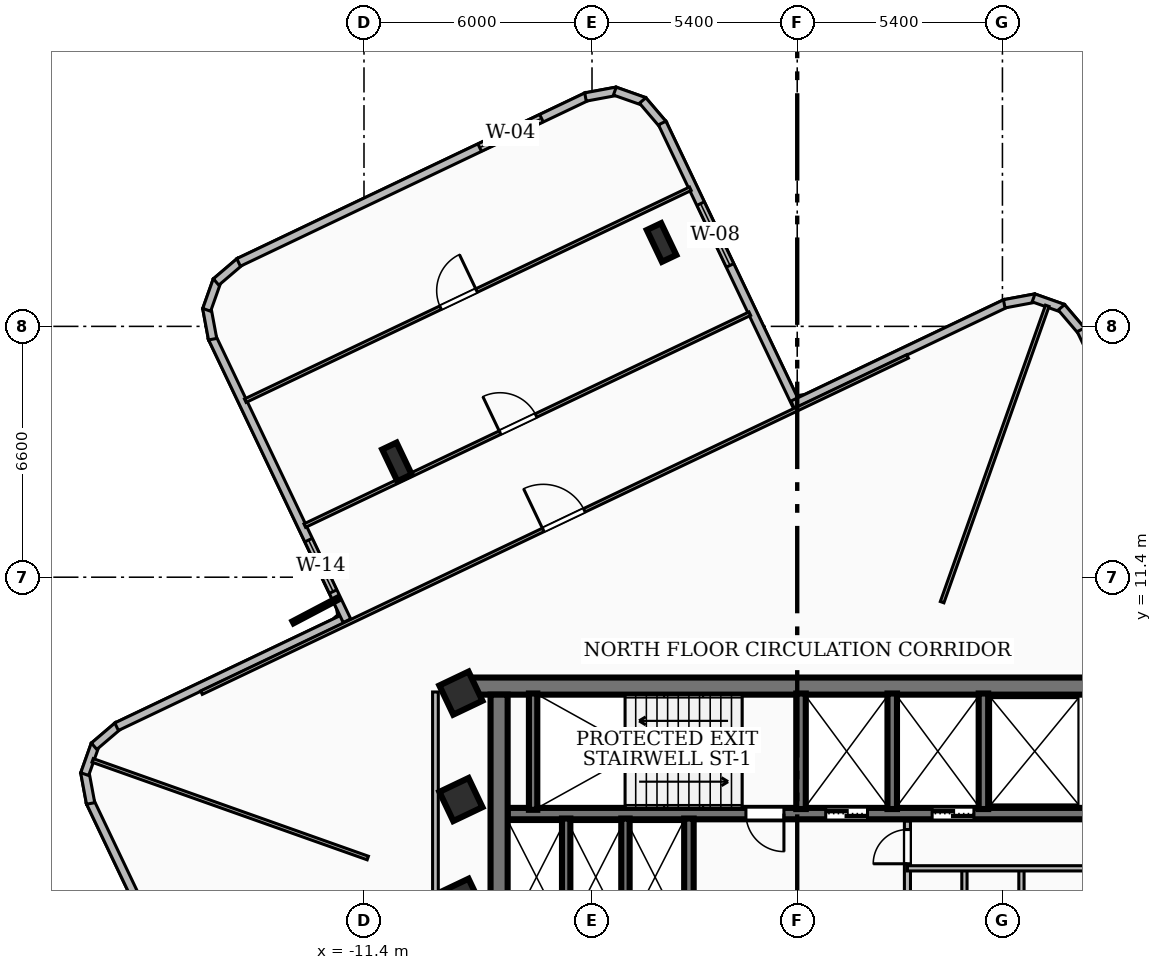
"""IFC4 building model, lengths in metres.
Left out: names, types, materials, properties, quantities, classifications, styles, units other than length and angle.
Written with IfcOpenShell. Run it as: python <this file> out.ifc"""

import sys

from ifc_helpers import new_model, si_unit, direction, frame, frame_2d, origin, origin_2d, place, context, subcontext, project, spatial, rectangle, i_section, extrude, element, fill, save


model = new_model("IFC4")
c1 = context("Model", 3, precision=1e-05, world=origin(), true_north=direction((0.0, 1.0)))
c2 = subcontext(c1, "Body", "Model", "MODEL_VIEW")
j1 = project(units=[si_unit("LENGTHUNIT", "METRE"), si_unit("PLANEANGLEUNIT", "RADIAN")], contexts=[c1])
p1 = place(None, origin())
s1 = spatial("IfcSite", under=j1, at=p1, CompositionType="ELEMENT")
p2 = place(p1, origin())
s2 = spatial("IfcBuilding", under=s1, at=p2, CompositionType="ELEMENT")
p3 = place(p2, frame((0.0, 0.0, 188.28)))
s3 = spatial("IfcBuildingStorey", under=s2, at=p3, CompositionType="ELEMENT", Elevation=188.28)
p4 = place(p3, frame((-8.78, 8.535, 0.0), z_axis=(0.0, 0.0, 1.0), x_axis=(1.0, 0.0, 0.0)))
e1 = element("IfcWall", 1, at=p4, inside=s3, PredefinedType="SHEAR", context=c2, shape_type="SweptSolid", body=[
    extrude(rectangle(XDim=17.56, YDim=0.45, at=frame_2d((8.78, 0.0))), origin(), (0.0, 0.0, 1.0), 4.06),
])
p5 = place(p3, frame((-7.845, 1.975, 0.0), z_axis=(0.0, 0.0, 1.0), x_axis=(0.0, 1.0, 0.0)))
e2 = element("IfcWall", 2, at=p5, inside=s3, PredefinedType="SHEAR", context=c2, shape_type="SweptSolid", body=[
    extrude(rectangle(XDim=6.335, YDim=0.45, at=frame_2d((3.167, 0.0))), origin(), (0.0, 0.0, 1.0), 4.06),
])
p6 = place(p3, frame((7.62, 5.18, 0.0), z_axis=(0.0, 0.0, 1.0), x_axis=(-1.0, 0.0, 0.0)))
e3 = element("IfcWall", 3, at=p6, inside=s3, PredefinedType="SOLIDWALL", context=c2, shape_type="SweptSolid", body=[
    extrude(rectangle(XDim=15.24, YDim=0.3, at=frame_2d((7.62, 0.0))), origin(), (0.0, 0.0, 1.0), 4.06),
])
p7 = place(p6, frame((5.77, 0.0, 0.0)))
e4 = element("IfcOpeningElement", 4, at=p7, cuts=e3, PredefinedType="OPENING", context=c2, shape_type="SweptSolid", body=[
    extrude(rectangle(XDim=1.1, YDim=2.15, at=frame_2d((0.55, 1.075))), frame((0.0, 0.16, 0.0), z_axis=(0.0, -1.0, 0.0), x_axis=(1.0, 0.0, 0.0)), (0.0, 0.0, 1.0), 0.32),
])
p8 = place(p6, frame((2.97, 0.0, 0.0)))
e5 = element("IfcOpeningElement", 5, at=p8, cuts=e3, PredefinedType="OPENING", context=c2, shape_type="SweptSolid", body=[
    extrude(rectangle(XDim=1.1, YDim=2.15, at=frame_2d((0.55, 1.075))), frame((0.0, 0.16, 0.0), z_axis=(0.0, -1.0, 0.0), x_axis=(1.0, 0.0, 0.0)), (0.0, 0.0, 1.0), 0.32),
])
p9 = place(p6, frame((7.97, 0.0, 0.0)))
e6 = element("IfcOpeningElement", 6, at=p9, cuts=e3, PredefinedType="OPENING", context=c2, shape_type="SweptSolid", body=[
    extrude(rectangle(XDim=1.0, YDim=2.1, at=frame_2d((0.5, 1.05))), frame((0.0, 0.16, 0.0), z_axis=(0.0, -1.0, 0.0), x_axis=(1.0, 0.0, 0.0)), (0.0, 0.0, 1.0), 0.32),
])
p10 = place(p3, frame((-6.95, 5.28, 0.0), z_axis=(0.0, 0.0, 1.0), x_axis=(0.0, 1.0, 0.0)))
e7 = element("IfcWall", 7, at=p10, inside=s3, PredefinedType="SOLIDWALL", context=c2, shape_type="SweptSolid", body=[
    extrude(rectangle(XDim=3.06, YDim=0.22, at=frame_2d((1.53, 0.0))), origin(), (0.0, 0.0, 1.0), 4.06),
])
for number, where, z_axis, x_axis in (
    (8, (0.1, 5.3, 0.0), (0.0, 0.0, 1.0), (0.0, 1.0, 0.0)),
    (9, (2.5, 5.3, 0.0), (0.0, 0.0, 1.0), (0.0, 1.0, 0.0)),
    (10, (4.9, 5.3, 0.0), (0.0, 0.0, 1.0), (0.0, 1.0, 0.0)),
):
    element("IfcWall", number, at=place(p3, frame(where, z_axis=z_axis, x_axis=x_axis)), inside=s3, PredefinedType="SOLIDWALL", context=c2, shape_type="SweptSolid", body=[
        extrude(rectangle(XDim=3.04, YDim=0.25, at=frame_2d((1.52, 0.0))), origin(), (0.0, 0.0, 1.0), 4.06),
    ])
p11 = place(p3, frame((-2.85, 1.98, 0.0), z_axis=(0.0, 0.0, 1.0), x_axis=(0.0, 1.0, 0.0)))
e11 = element("IfcWall", 11, at=p11, inside=s3, PredefinedType="SOLIDWALL", context=c2, shape_type="SweptSolid", body=[
    extrude(rectangle(XDim=3.07, YDim=0.25, at=frame_2d((1.535, 0.0))), origin(), (0.0, 0.0, 1.0), 4.06),
])
for number, where, z_axis, x_axis in (
    (12, (-6.08, 1.98, 0.0), (0.0, 0.0, 1.0), (0.0, 1.0, 0.0)),
    (13, (-4.52, 1.98, 0.0), (0.0, 0.0, 1.0), (0.0, 1.0, 0.0)),
):
    element("IfcWall", number, at=place(p3, frame(where, z_axis=z_axis, x_axis=x_axis)), inside=s3, PredefinedType="SOLIDWALL", context=c2, shape_type="SweptSolid", body=[
        extrude(rectangle(XDim=3.07, YDim=0.22, at=frame_2d((1.535, 0.0))), origin(), (0.0, 0.0, 1.0), 4.06),
    ])
for number, where, z_axis, x_axis in (
    (14, (-8.85, 2.9, 0.0), (0.0, 0.0, 1.0), (0.903, 0.43, 0.0)),
    (15, (-8.85, 5.55, 0.0), (0.0, 0.0, 1.0), (0.903, 0.43, 0.0)),
    (16, (-8.85, 8.35, 0.0), (0.0, 0.0, 1.0), (0.903, 0.43, 0.0)),
):
    element("IfcColumn", number, at=place(p3, frame(where, z_axis=z_axis, x_axis=x_axis)), inside=s3, PredefinedType="COLUMN", context=c2, shape_type="SweptSolid", body=[
        extrude(rectangle(XDim=0.85, YDim=0.85, at=origin_2d()), origin(), (0.0, 0.0, 1.0), 4.32),
    ])
for number, where, z_axis, x_axis in (
    (17, (-3.57, 20.207, 0.0), (0.0, 0.0, 1.0), (0.903, 0.43, 0.0)),
    (18, (-10.533, 14.433, 0.0), (0.0, 0.0, 1.0), (0.903, 0.43, 0.0)),
):
    element("IfcColumn", number, at=place(p3, frame(where, z_axis=z_axis, x_axis=x_axis)), inside=s3, PredefinedType="COLUMN", context=c2, shape_type="SweptSolid", body=[
        extrude(i_section(OverallWidth=0.418, OverallDepth=0.927, WebThickness=0.019, FlangeThickness=0.032, at=origin_2d()), origin(), (0.0, 0.0, 1.0), 4.32),
    ])
p12 = place(p3, frame((-15.935, -0.119, 0.0), z_axis=(0.0, 0.0, 1.0), x_axis=(-0.429997588734, 0.902830035878, 0.0)))
e19 = element("IfcWall", 19, at=p12, inside=s3, PredefinedType="SOLIDWALL", context=c2, shape_type="SweptSolid", body=[
    extrude(rectangle(XDim=6.218, YDim=0.22, at=frame_2d((3.109, 0.0))), origin(), (0.0, 0.0, 1.0), 4.06),
])
p13 = place(p3, frame((-18.593, 5.447, 0.0), z_axis=(0.0, 0.0, 1.0), x_axis=(-0.183282428617, 0.983060298944, 0.0)))
e20 = element("IfcWall", 20, at=p13, inside=s3, PredefinedType="SOLIDWALL", context=c2, shape_type="SweptSolid", body=[
    extrude(rectangle(XDim=0.835, YDim=0.22, at=frame_2d((0.417, 0.0))), origin(), (0.0, 0.0, 1.0), 4.06),
])
p14 = place(p3, frame((-18.749, 6.219, 0.0), z_axis=(0.0, 0.0, 1.0), x_axis=(0.33403451258, 0.942560843875, 0.0)))
e21 = element("IfcWall", 21, at=p14, inside=s3, PredefinedType="SOLIDWALL", context=c2, shape_type="SweptSolid", body=[
    extrude(rectangle(XDim=0.82, YDim=0.22, at=frame_2d((0.41, 0.0))), origin(), (0.0, 0.0, 1.0), 4.06),
])
p15 = place(p3, frame((-18.502, 6.952, 0.0), z_axis=(0.0, 0.0, 1.0), x_axis=(0.76070207285, 0.649101191157, 0.0)))
e22 = element("IfcWall", 22, at=p15, inside=s3, PredefinedType="SOLIDWALL", context=c2, shape_type="SweptSolid", body=[
    extrude(rectangle(XDim=0.833, YDim=0.22, at=frame_2d((0.417, 0.0))), origin(), (0.0, 0.0, 1.0), 4.06),
])
p16 = place(p3, frame((-17.91, 7.466, 0.0), z_axis=(0.0, 0.0, 1.0), x_axis=(0.902871867899, 0.429909746524, 0.0)))
e23 = element("IfcWall", 23, at=p16, inside=s3, PredefinedType="SOLIDWALL", context=c2, shape_type="SweptSolid", body=[
    extrude(rectangle(XDim=6.76, YDim=0.22, at=frame_2d((3.38, 0.0))), origin(), (0.0, 0.0, 1.0), 4.06),
])
p17 = place(p3, frame((-11.848, 10.255, 0.0), z_axis=(0.0, 0.0, 1.0), x_axis=(-0.429985218275, 0.902835927544, 0.0)))
e24 = element("IfcWall", 24, at=p17, inside=s3, PredefinedType="SOLIDWALL", context=c2, shape_type="SweptSolid", body=[
    extrude(rectangle(XDim=8.259, YDim=0.22, at=frame_2d((4.129, 0.0))), origin(), (0.0, 0.0, 1.0), 4.06),
])
p18 = place(p17, frame((0.85, 0.0, 0.85)))
e25 = element("IfcOpeningElement", 25, at=p18, cuts=e24, PredefinedType="OPENING", context=c2, shape_type="SweptSolid", body=[
    extrude(rectangle(XDim=1.5, YDim=1.5, at=frame_2d((0.75, 0.75))), frame((0.0, 0.12, 0.0), z_axis=(0.0, -1.0, 0.0), x_axis=(1.0, 0.0, 0.0)), (0.0, 0.0, 1.0), 0.24),
])
p19 = place(p3, frame((-15.383, 17.663, 0.0), z_axis=(0.0, 0.0, 1.0), x_axis=(-0.183052517283, 0.983103135951, 0.0)))
e26 = element("IfcWall", 26, at=p19, inside=s3, PredefinedType="SOLIDWALL", context=c2, shape_type="SweptSolid", body=[
    extrude(rectangle(XDim=0.835, YDim=0.22, at=frame_2d((0.417, 0.0))), origin(), (0.0, 0.0, 1.0), 4.06),
])
p20 = place(p3, frame((-15.539, 18.435, 0.0), z_axis=(0.0, 0.0, 1.0), x_axis=(0.334298968001, 0.94246708165, 0.0)))
e27 = element("IfcWall", 27, at=p20, inside=s3, PredefinedType="SOLIDWALL", context=c2, shape_type="SweptSolid", body=[
    extrude(rectangle(XDim=0.82, YDim=0.22, at=frame_2d((0.41, 0.0))), origin(), (0.0, 0.0, 1.0), 4.06),
])
p21 = place(p3, frame((-15.292, 19.168, 0.0), z_axis=(0.0, 0.0, 1.0), x_axis=(0.76070207285, 0.649101191157, 0.0)))
e28 = element("IfcWall", 28, at=p21, inside=s3, PredefinedType="SOLIDWALL", context=c2, shape_type="SweptSolid", body=[
    extrude(rectangle(XDim=0.833, YDim=0.22, at=frame_2d((0.417, 0.0))), origin(), (0.0, 0.0, 1.0), 4.06),
])
p22 = place(p3, frame((-14.7, 19.682, 0.0), z_axis=(0.0, 0.0, 1.0), x_axis=(0.902875615419, 0.429901876109, 0.0)))
e29 = element("IfcWall", 29, at=p22, inside=s3, PredefinedType="SOLIDWALL", context=c2, shape_type="SweptSolid", body=[
    extrude(rectangle(XDim=10.163, YDim=0.22, at=frame_2d((5.082, 0.0))), origin(), (0.0, 0.0, 1.0), 4.06),
])
p23 = place(p22, frame((7.027, 0.0, 0.85)))
e30 = element("IfcOpeningElement", 30, at=p23, cuts=e29, PredefinedType="OPENING", context=c2, shape_type="SweptSolid", body=[
    extrude(rectangle(XDim=1.8, YDim=2.0, at=frame_2d((0.9, 1.0))), frame((0.0, 0.12, 0.0), z_axis=(0.0, -1.0, 0.0), x_axis=(1.0, 0.0, 0.0)), (0.0, 0.0, 1.0), 0.24),
])
p24 = place(p3, frame((-5.572, 24.035, 0.0), z_axis=(0.0, 0.0, 1.0), x_axis=(0.983270369864, 0.182152078628, 0.0)))
e31 = element("IfcWall", 31, at=p24, inside=s3, PredefinedType="SOLIDWALL", context=c2, shape_type="SweptSolid", body=[
    extrude(rectangle(XDim=0.835, YDim=0.22, at=frame_2d((0.417, 0.0))), origin(), (0.0, 0.0, 1.0), 4.06),
])
p25 = place(p3, frame((-4.8, 24.19, 0.0), z_axis=(0.0, 0.0, 1.0), x_axis=(0.94293533639, -0.332975902111, 0.0)))
e32 = element("IfcWall", 32, at=p25, inside=s3, PredefinedType="SOLIDWALL", context=c2, shape_type="SweptSolid", body=[
    extrude(rectangle(XDim=0.82, YDim=0.22, at=frame_2d((0.41, 0.0))), origin(), (0.0, 0.0, 1.0), 4.06),
])
p26 = place(p3, frame((-4.067, 23.944, 0.0), z_axis=(0.0, 0.0, 1.0), x_axis=(0.648522984106, -0.761195072952, 0.0)))
e33 = element("IfcWall", 33, at=p26, inside=s3, PredefinedType="SOLIDWALL", context=c2, shape_type="SweptSolid", body=[
    extrude(rectangle(XDim=0.834, YDim=0.22, at=frame_2d((0.417, 0.0))), origin(), (0.0, 0.0, 1.0), 4.06),
])
p27 = place(p3, frame((-3.553, 23.351, 0.0), z_axis=(0.0, 0.0, 1.0), x_axis=(0.429939317392, -0.902857786897, 0.0)))
e34 = element("IfcWall", 34, at=p27, inside=s3, PredefinedType="SOLIDWALL", context=c2, shape_type="SweptSolid", body=[
    extrude(rectangle(XDim=8.259, YDim=0.22, at=frame_2d((4.13, 0.0))), origin(), (0.0, 0.0, 1.0), 4.06),
])
p28 = place(p27, frame((2.35, 0.0, 0.85)))
e35 = element("IfcOpeningElement", 35, at=p28, cuts=e34, PredefinedType="OPENING", context=c2, shape_type="SweptSolid", body=[
    extrude(rectangle(XDim=1.8, YDim=1.8, at=frame_2d((0.9, 0.9))), frame((0.0, 0.12, 0.0), z_axis=(0.0, -1.0, 0.0), x_axis=(1.0, 0.0, 0.0)), (0.0, 0.0, 1.0), 0.24),
])
p29 = place(p3, frame((-0.119, 15.935, 0.0), z_axis=(0.0, 0.0, 1.0), x_axis=(0.902830035878, 0.429997588734, 0.0)))
e36 = element("IfcWall", 36, at=p29, inside=s3, PredefinedType="SOLIDWALL", context=c2, shape_type="SweptSolid", body=[
    extrude(rectangle(XDim=6.218, YDim=0.22, at=frame_2d((3.109, 0.0))), origin(), (0.0, 0.0, 1.0), 4.06),
])
p30 = place(p3, frame((5.447, 18.593, 0.0), z_axis=(0.0, 0.0, 1.0), x_axis=(0.983060298944, 0.183282428617, 0.0)))
e37 = element("IfcWall", 37, at=p30, inside=s3, PredefinedType="SOLIDWALL", context=c2, shape_type="SweptSolid", body=[
    extrude(rectangle(XDim=0.835, YDim=0.22, at=frame_2d((0.417, 0.0))), origin(), (0.0, 0.0, 1.0), 4.06),
])
p31 = place(p3, frame((6.219, 18.749, 0.0), z_axis=(0.0, 0.0, 1.0), x_axis=(0.942560843875, -0.33403451258, 0.0)))
e38 = element("IfcWall", 38, at=p31, inside=s3, PredefinedType="SOLIDWALL", context=c2, shape_type="SweptSolid", body=[
    extrude(rectangle(XDim=0.82, YDim=0.22, at=frame_2d((0.41, 0.0))), origin(), (0.0, 0.0, 1.0), 4.06),
])
p32 = place(p3, frame((6.952, 18.502, 0.0), z_axis=(0.0, 0.0, 1.0), x_axis=(0.649101191157, -0.76070207285, 0.0)))
e39 = element("IfcWall", 39, at=p32, inside=s3, PredefinedType="SOLIDWALL", context=c2, shape_type="SweptSolid", body=[
    extrude(rectangle(XDim=0.833, YDim=0.22, at=frame_2d((0.417, 0.0))), origin(), (0.0, 0.0, 1.0), 4.06),
])
p33 = place(p3, frame((7.466, 17.91, 0.0), z_axis=(0.0, 0.0, 1.0), x_axis=(0.429909746524, -0.902871867899, 0.0)))
e40 = element("IfcWall", 40, at=p33, inside=s3, PredefinedType="SOLIDWALL", context=c2, shape_type="SweptSolid", body=[
    extrude(rectangle(XDim=6.76, YDim=0.22, at=frame_2d((3.38, 0.0))), origin(), (0.0, 0.0, 1.0), 4.06),
])
p34 = place(p3, frame((2.9, 2.04, 0.0), z_axis=(0.0, 0.0, 1.0), x_axis=(0.0, 1.0, 0.0)))
e41 = element("IfcWall", 41, at=p34, inside=s3, PredefinedType="PARTITIONING", context=c2, shape_type="SweptSolid", body=[
    extrude(rectangle(XDim=2.94, YDim=0.16, at=frame_2d((1.47, 0.0))), origin(), (0.0, 0.0, 1.0), 3.29),
])
p35 = place(p34, frame((1.82, 0.0, 0.0)))
e42 = element("IfcOpeningElement", 42, at=p35, cuts=e41, PredefinedType="OPENING", context=c2, shape_type="SweptSolid", body=[
    extrude(rectangle(XDim=0.9, YDim=2.06, at=frame_2d((0.45, 1.03))), frame((0.0, 0.09, 0.0), z_axis=(0.0, -1.0, 0.0), x_axis=(1.0, 0.0, 0.0)), (0.0, 0.0, 1.0), 0.18),
])
p36 = place(p3, frame((2.9, 3.74, 0.0), z_axis=(0.0, 0.0, 1.0), x_axis=(1.0, 0.0, 0.0)))
e43 = element("IfcWall", 43, at=p36, inside=s3, PredefinedType="PARTITIONING", context=c2, shape_type="SweptSolid", body=[
    extrude(rectangle(XDim=4.65, YDim=0.138, at=frame_2d((2.325, 0.0))), origin(), (0.0, 0.0, 1.0), 4.06),
])
for number, where, z_axis, x_axis in (
    (44, (4.4, 1.85, 0.0), (0.0, 0.0, 1.0), (0.0, 1.0, 0.0)),
    (45, (5.9, 1.85, 0.0), (0.0, 0.0, 1.0), (0.0, 1.0, 0.0)),
):
    element("IfcWall", number, at=place(p3, frame(where, z_axis=z_axis, x_axis=x_axis)), inside=s3, PredefinedType="PARTITIONING", context=c2, shape_type="SweptSolid", body=[
        extrude(rectangle(XDim=1.89, YDim=0.138, at=frame_2d((0.945, 0.0))), origin(), (0.0, 0.0, 1.0), 3.29),
    ])
p37 = place(p3, frame((-9.52, 1.75, 0.0), z_axis=(0.0, 0.0, 1.0), x_axis=(0.0, 1.0, 0.0)))
e46 = element("IfcWall", 46, at=p37, inside=s3, PredefinedType="PARTITIONING", context=c2, shape_type="SweptSolid", body=[
    extrude(rectangle(XDim=6.63, YDim=0.15, at=frame_2d((3.315, 0.0))), origin(), (0.0, 0.0, 1.0), 4.06),
])
p38 = place(p3, frame((3.813, 10.743, 0.0), z_axis=(0.0, 0.0, 1.0), x_axis=(0.334412381202, 0.942426845595, 0.0)))
e47 = element("IfcWall", 47, at=p38, inside=s3, PredefinedType="PARTITIONING", context=c2, shape_type="SweptSolid", body=[
    extrude(rectangle(XDim=8.274, YDim=0.1, at=frame_2d((4.137, 0.0))), origin(), (0.0, 0.0, 1.0), 4.06),
])
p39 = place(p3, frame((-11.3, 4.011, 0.0), z_axis=(0.0, 0.0, 1.0), x_axis=(-0.942439374513, 0.334377070636, 0.0)))
e48 = element("IfcWall", 48, at=p39, inside=s3, PredefinedType="PARTITIONING", context=c2, shape_type="SweptSolid", body=[
    extrude(rectangle(XDim=7.683, YDim=0.1, at=frame_2d((3.842, 0.0))), origin(), (0.0, 0.0, 1.0), 4.06),
])
p40 = place(p3, frame((-15.677, 8.362, 0.0), z_axis=(0.0, 0.0, 1.0), x_axis=(0.902864685064, 0.429924831179, 0.0)))
e49 = element("IfcWall", 49, at=p40, inside=s3, PredefinedType="PARTITIONING", context=c2, shape_type="SweptSolid", body=[
    extrude(rectangle(XDim=20.58, YDim=0.1, at=frame_2d((10.29, 0.0))), origin(), (0.0, 0.0, 1.0), 3.364),
])
p41 = place(p40, frame((9.96, 0.0, 0.0)))
e50 = element("IfcOpeningElement", 50, at=p41, cuts=e49, PredefinedType="OPENING", context=c2, shape_type="SweptSolid", body=[
    extrude(rectangle(XDim=1.2, YDim=2.1, at=frame_2d((0.6, 1.05))), frame((0.0, 0.06, 0.0), z_axis=(0.0, -1.0, 0.0), x_axis=(1.0, 0.0, 0.0)), (0.0, 0.0, 1.0), 0.12),
])
p42 = place(p3, frame((-12.958, 12.758, 0.0), z_axis=(0.0, 0.0, 1.0), x_axis=(0.902867825554, 0.429918235923, 0.0)))
e51 = element("IfcWall", 51, at=p42, inside=s3, PredefinedType="PARTITIONING", context=c2, shape_type="SweptSolid", body=[
    extrude(rectangle(XDim=12.97, YDim=0.1, at=frame_2d((6.485, 0.0))), origin(), (0.0, 0.0, 1.0), 3.364),
])
p43 = place(p42, frame((5.69, 0.0, 0.0)))
e52 = element("IfcOpeningElement", 52, at=p43, cuts=e51, PredefinedType="OPENING", context=c2, shape_type="SweptSolid", body=[
    extrude(rectangle(XDim=1.05, YDim=2.08, at=frame_2d((0.525, 1.04))), frame((0.0, 0.06, 0.0), z_axis=(0.0, -1.0, 0.0), x_axis=(1.0, 0.0, 0.0)), (0.0, 0.0, 1.0), 0.12),
])
p44 = place(p3, frame((-14.523, 16.045, 0.0), z_axis=(0.0, 0.0, 1.0), x_axis=(0.902860518824, 0.429933580392, 0.0)))
e53 = element("IfcWall", 53, at=p44, inside=s3, PredefinedType="PARTITIONING", context=c2, shape_type="SweptSolid", body=[
    extrude(rectangle(XDim=12.97, YDim=0.1, at=frame_2d((6.485, 0.0))), origin(), (0.0, 0.0, 1.0), 4.06),
])
p45 = place(p44, frame((5.69, 0.0, 0.0)))
e54 = element("IfcOpeningElement", 54, at=p45, cuts=e53, PredefinedType="OPENING", context=c2, shape_type="SweptSolid", body=[
    extrude(rectangle(XDim=1.05, YDim=2.08, at=frame_2d((0.525, 1.04))), frame((0.0, 0.06, 0.0), z_axis=(0.0, -1.0, 0.0), x_axis=(1.0, 0.0, 0.0)), (0.0, 0.0, 1.0), 0.12),
])
p46 = place(p18, origin())
e55 = element("IfcWindow", 55, at=p46, inside=s3, PartitioningType="SINGLE_PANEL", PredefinedType="WINDOW", context=c2, shape_type="SweptSolid", body=[
    extrude(rectangle(XDim=1.5, YDim=1.5, at=frame_2d((0.75, 0.75))), frame((0.0, 0.03, 0.0), z_axis=(0.0, -1.0, 0.0), x_axis=(1.0, 0.0, 0.0)), (0.0, 0.0, 1.0), 0.06),
])
fill(e25, e55)
p47 = place(p23, origin())
e56 = element("IfcWindow", 56, at=p47, inside=s3, PartitioningType="SINGLE_PANEL", PredefinedType="WINDOW", context=c2, shape_type="SweptSolid", body=[
    extrude(rectangle(XDim=1.8, YDim=2.0, at=frame_2d((0.9, 1.0))), frame((0.0, 0.03, 0.0), z_axis=(0.0, -1.0, 0.0), x_axis=(1.0, 0.0, 0.0)), (0.0, 0.0, 1.0), 0.06),
])
fill(e30, e56)
p48 = place(p28, origin())
e57 = element("IfcWindow", 57, at=p48, inside=s3, PartitioningType="SINGLE_PANEL", PredefinedType="WINDOW", context=c2, shape_type="SweptSolid", body=[
    extrude(rectangle(XDim=1.8, YDim=1.8, at=frame_2d((0.9, 0.9))), frame((0.0, 0.03, 0.0), z_axis=(0.0, -1.0, 0.0), x_axis=(1.0, 0.0, 0.0)), (0.0, 0.0, 1.0), 0.06),
])
fill(e35, e57)
p49 = place(p7, origin())
e58 = element("IfcDoor", 58, at=p49, inside=s3, OperationType="DOUBLE_DOOR_SLIDING", PredefinedType="DOOR", context=c2, shape_type="SweptSolid", body=[
    extrude(rectangle(XDim=1.1, YDim=2.15, at=frame_2d((0.55, 1.075))), frame((0.0, 0.025, 0.0), z_axis=(0.0, -1.0, 0.0), x_axis=(1.0, 0.0, 0.0)), (0.0, 0.0, 1.0), 0.05),
])
fill(e4, e58)
p50 = place(p8, origin())
e59 = element("IfcDoor", 59, at=p50, inside=s3, OperationType="DOUBLE_DOOR_SLIDING", PredefinedType="DOOR", context=c2, shape_type="SweptSolid", body=[
    extrude(rectangle(XDim=1.1, YDim=2.15, at=frame_2d((0.55, 1.075))), frame((0.0, 0.025, 0.0), z_axis=(0.0, -1.0, 0.0), x_axis=(1.0, 0.0, 0.0)), (0.0, 0.0, 1.0), 0.05),
])
fill(e5, e59)
p51 = place(p9, origin())
e60 = element("IfcDoor", 60, at=p51, inside=s3, OperationType="SINGLE_SWING_LEFT", PredefinedType="DOOR", context=c2, shape_type="SweptSolid", body=[
    extrude(rectangle(XDim=1.0, YDim=2.1, at=frame_2d((0.5, 1.05))), frame((0.0, 0.025, 0.0), z_axis=(0.0, -1.0, 0.0), x_axis=(1.0, 0.0, 0.0)), (0.0, 0.0, 1.0), 0.05),
])
fill(e6, e60)
p52 = place(p35, origin())
e61 = element("IfcDoor", 61, at=p52, inside=s3, OperationType="SINGLE_SWING_LEFT", PredefinedType="DOOR", context=c2, shape_type="SweptSolid", body=[
    extrude(rectangle(XDim=0.9, YDim=2.06, at=frame_2d((0.45, 1.03))), frame((0.0, 0.025, 0.0), z_axis=(0.0, -1.0, 0.0), x_axis=(1.0, 0.0, 0.0)), (0.0, 0.0, 1.0), 0.05),
])
fill(e42, e61)
p53 = place(p41, origin())
e62 = element("IfcDoor", 62, at=p53, inside=s3, OperationType="SINGLE_SWING_LEFT", PredefinedType="DOOR", context=c2, shape_type="SweptSolid", body=[
    extrude(rectangle(XDim=1.2, YDim=2.1, at=frame_2d((0.6, 1.05))), frame((0.0, 0.025, 0.0), z_axis=(0.0, -1.0, 0.0), x_axis=(1.0, 0.0, 0.0)), (0.0, 0.0, 1.0), 0.05),
])
fill(e50, e62)
p54 = place(p43, origin())
e63 = element("IfcDoor", 63, at=p54, inside=s3, OperationType="SINGLE_SWING_LEFT", PredefinedType="DOOR", context=c2, shape_type="SweptSolid", body=[
    extrude(rectangle(XDim=1.05, YDim=2.08, at=frame_2d((0.525, 1.04))), frame((0.0, 0.025, 0.0), z_axis=(0.0, -1.0, 0.0), x_axis=(1.0, 0.0, 0.0)), (0.0, 0.0, 1.0), 0.05),
])
fill(e52, e63)
p55 = place(p45, origin())
e64 = element("IfcDoor", 64, at=p55, inside=s3, OperationType="SINGLE_SWING_RIGHT", PredefinedType="DOOR", context=c2, shape_type="SweptSolid", body=[
    extrude(rectangle(XDim=1.05, YDim=2.08, at=frame_2d((0.525, 1.04))), frame((0.0, 0.025, 0.0), z_axis=(0.0, -1.0, 0.0), x_axis=(1.0, 0.0, 0.0)), (0.0, 0.0, 1.0), 0.05),
])
fill(e54, e64)
save(model, sys.argv[1])
